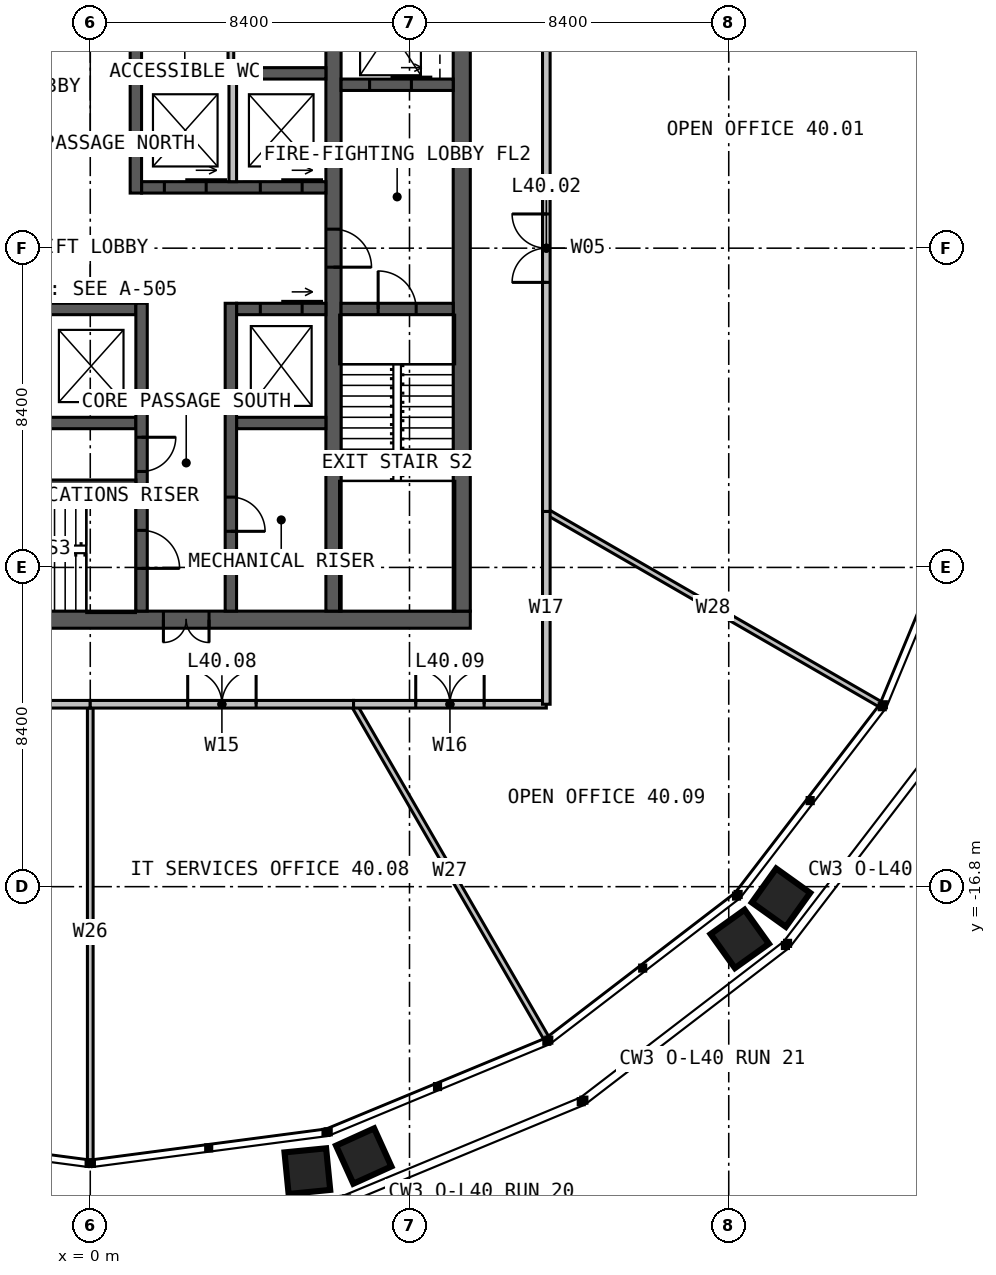
"""IFC4 building model, lengths in metres.
Left out: names, types, materials, properties, quantities, classifications, styles, units other than length and angle.
Written with IfcOpenShell. Run it as: python <this file> out.ifc"""

import sys

from ifc_helpers import new_model, si_unit, direction, frame, frame_2d, origin, place, context, subcontext, project, spatial, rectangle, extrude, element, fill, save


model = new_model("IFC4")
c1 = context("Model", 3, precision=1e-05, world=origin(), true_north=direction((0.0, 1.0)))
c2 = subcontext(c1, "Body", "Model", "MODEL_VIEW")
j1 = project(units=[si_unit("LENGTHUNIT", "METRE"), si_unit("PLANEANGLEUNIT", "RADIAN")], contexts=[c1])
p1 = place(None, origin())
s1 = spatial("IfcSite", under=j1, at=p1, CompositionType="ELEMENT")
p2 = place(p1, origin())
s2 = spatial("IfcBuilding", under=s1, at=p2, CompositionType="ELEMENT")
p3 = place(p2, frame((0.0, 0.0, 167.0)))
s3 = spatial("IfcBuildingStorey", under=s2, at=p3, CompositionType="ELEMENT", Elevation=167.0)
p4 = place(p3, frame((10.0, -9.775, 0.0), z_axis=(0.0, 0.0, 1.0), x_axis=(-1.0, 0.0, 0.0)))
e1 = element("IfcWall", 1, at=p4, inside=s3, PredefinedType="SOLIDWALL", context=c2, shape_type="SweptSolid", body=[
    extrude(rectangle(XDim=20.0, YDim=0.45, at=frame_2d((10.0, 0.0))), origin(), (0.0, 0.0, 1.0), 4.0),
])
p5 = place(p4, frame((6.875, 0.0, 0.0)))
e2 = element("IfcOpeningElement", 2, at=p5, cuts=e1, PredefinedType="OPENING", context=c2, shape_type="SweptSolid", body=[
    extrude(rectangle(XDim=1.2, YDim=2.2, at=frame_2d((0.6, 1.1))), frame((0.0, 0.235, 0.0), z_axis=(0.0, -1.0, 0.0), x_axis=(1.0, 0.0, 0.0)), (0.0, 0.0, 1.0), 0.47),
])
p6 = place(p3, frame((9.775, -9.55, 0.0), z_axis=(0.0, 0.0, 1.0), x_axis=(0.0, 1.0, 0.0)))
e3 = element("IfcWall", 3, at=p6, inside=s3, PredefinedType="SOLIDWALL", context=c2, shape_type="SweptSolid", body=[
    extrude(rectangle(XDim=19.1, YDim=0.45, at=frame_2d((9.55, 0.0))), origin(), (0.0, 0.0, 1.0), 4.0),
])
p7 = place(p3, frame((6.4, 9.55, 0.0), z_axis=(0.0, 0.0, 1.0), x_axis=(0.0, -1.0, 0.0)))
e4 = element("IfcWall", 4, at=p7, inside=s3, PredefinedType="SOLIDWALL", context=c2, shape_type="SweptSolid", body=[
    extrude(rectangle(XDim=19.1, YDim=0.4, at=frame_2d((9.55, 0.0))), origin(), (0.0, 0.0, 1.0), 4.0),
])
p8 = place(p7, frame((9.05, 0.0, 0.0)))
e5 = element("IfcOpeningElement", 5, at=p8, cuts=e4, PredefinedType="OPENING", context=c2, shape_type="SweptSolid", body=[
    extrude(rectangle(XDim=1.0, YDim=2.2, at=frame_2d((0.5, 1.1))), frame((0.0, 0.21, 0.0), z_axis=(0.0, -1.0, 0.0), x_axis=(1.0, 0.0, 0.0)), (0.0, 0.0, 1.0), 0.42),
])
p9 = place(p3, frame((1.35, 1.6, 0.0), z_axis=(0.0, 0.0, 1.0), x_axis=(1.0, 0.0, 0.0)))
e6 = element("IfcWall", 6, at=p9, inside=s3, PredefinedType="SOLIDWALL", context=c2, shape_type="SweptSolid", body=[
    extrude(rectangle(XDim=4.85, YDim=0.3, at=frame_2d((2.425, 0.0))), origin(), (0.0, 0.0, 1.0), 4.0),
])
p10 = place(p9, frame((0.6, 0.0, 0.0)))
e7 = element("IfcOpeningElement", 7, at=p10, cuts=e6, PredefinedType="OPENING", context=c2, shape_type="SweptSolid", body=[
    extrude(rectangle(XDim=1.1, YDim=2.2, at=frame_2d((0.55, 1.1))), frame((0.0, 0.16, 0.0), z_axis=(0.0, -1.0, 0.0), x_axis=(1.0, 0.0, 0.0)), (0.0, 0.0, 1.0), 0.32),
])
p11 = place(p9, frame((3.125, 0.0, 0.0)))
e8 = element("IfcOpeningElement", 8, at=p11, cuts=e6, PredefinedType="OPENING", context=c2, shape_type="SweptSolid", body=[
    extrude(rectangle(XDim=1.1, YDim=2.2, at=frame_2d((0.55, 1.1))), frame((0.0, 0.16, 0.0), z_axis=(0.0, -1.0, 0.0), x_axis=(1.0, 0.0, 0.0)), (0.0, 0.0, 1.0), 0.32),
])
p12 = place(p3, frame((1.35, 4.6, 0.0), z_axis=(0.0, 0.0, 1.0), x_axis=(1.0, 0.0, 0.0)))
e9 = element("IfcWall", 9, at=p12, inside=s3, PredefinedType="SOLIDWALL", context=c2, shape_type="SweptSolid", body=[
    extrude(rectangle(XDim=4.85, YDim=0.3, at=frame_2d((2.425, 0.0))), origin(), (0.0, 0.0, 1.0), 4.0),
])
p13 = place(p3, frame((1.2, 1.45, 0.0), z_axis=(0.0, 0.0, 1.0), x_axis=(0.0, 1.0, 0.0)))
e10 = element("IfcWall", 10, at=p13, inside=s3, PredefinedType="SOLIDWALL", context=c2, shape_type="SweptSolid", body=[
    extrude(rectangle(XDim=8.1, YDim=0.3, at=frame_2d((4.05, 0.0))), origin(), (0.0, 0.0, 1.0), 4.0),
])
p14 = place(p13, frame((3.8, 0.0, 0.0)))
e11 = element("IfcOpeningElement", 11, at=p14, cuts=e10, PredefinedType="OPENING", context=c2, shape_type="SweptSolid", body=[
    extrude(rectangle(XDim=1.0, YDim=2.2, at=frame_2d((0.5, 1.1))), frame((0.0, 0.16, 0.0), z_axis=(0.0, -1.0, 0.0), x_axis=(1.0, 0.0, 0.0)), (0.0, 0.0, 1.0), 0.32),
])
p15 = place(p13, frame((6.15, 0.0, 0.0)))
e12 = element("IfcOpeningElement", 12, at=p15, cuts=e10, PredefinedType="OPENING", context=c2, shape_type="SweptSolid", body=[
    extrude(rectangle(XDim=1.0, YDim=2.2, at=frame_2d((0.5, 1.1))), frame((0.0, 0.16, 0.0), z_axis=(0.0, -1.0, 0.0), x_axis=(1.0, 0.0, 0.0)), (0.0, 0.0, 1.0), 0.32),
])
p16 = place(p3, frame((-6.2, -1.6, 0.0), z_axis=(0.0, 0.0, 1.0), x_axis=(1.0, 0.0, 0.0)))
e13 = element("IfcWall", 13, at=p16, inside=s3, PredefinedType="SOLIDWALL", context=c2, shape_type="SweptSolid", body=[
    extrude(rectangle(XDim=7.4, YDim=0.3, at=frame_2d((3.7, 0.0))), origin(), (0.0, 0.0, 1.0), 4.0),
])
p17 = place(p3, frame((3.85, -1.6, 0.0), z_axis=(0.0, 0.0, 1.0), x_axis=(1.0, 0.0, 0.0)))
e14 = element("IfcWall", 14, at=p17, inside=s3, PredefinedType="SOLIDWALL", context=c2, shape_type="SweptSolid", body=[
    extrude(rectangle(XDim=2.35, YDim=0.3, at=frame_2d((1.175, 0.0))), origin(), (0.0, 0.0, 1.0), 4.0),
])
p18 = place(p17, frame((0.625, 0.0, 0.0)))
e15 = element("IfcOpeningElement", 15, at=p18, cuts=e14, PredefinedType="OPENING", context=c2, shape_type="SweptSolid", body=[
    extrude(rectangle(XDim=1.1, YDim=2.2, at=frame_2d((0.55, 1.1))), frame((0.0, 0.16, 0.0), z_axis=(0.0, -1.0, 0.0), x_axis=(1.0, 0.0, 0.0)), (0.0, 0.0, 1.0), 0.32),
])
p19 = place(p3, frame((-6.2, -4.6, 0.0), z_axis=(0.0, 0.0, 1.0), x_axis=(1.0, 0.0, 0.0)))
e16 = element("IfcWall", 16, at=p19, inside=s3, PredefinedType="SOLIDWALL", context=c2, shape_type="SweptSolid", body=[
    extrude(rectangle(XDim=7.4, YDim=0.3, at=frame_2d((3.7, 0.0))), origin(), (0.0, 0.0, 1.0), 4.0),
])
p20 = place(p3, frame((3.85, -4.6, 0.0), z_axis=(0.0, 0.0, 1.0), x_axis=(1.0, 0.0, 0.0)))
e17 = element("IfcWall", 17, at=p20, inside=s3, PredefinedType="SOLIDWALL", context=c2, shape_type="SweptSolid", body=[
    extrude(rectangle(XDim=2.35, YDim=0.3, at=frame_2d((1.175, 0.0))), origin(), (0.0, 0.0, 1.0), 4.0),
])
p21 = place(p3, frame((1.35, -1.45, 0.0), z_axis=(0.0, 0.0, 1.0), x_axis=(0.0, -1.0, 0.0)))
e18 = element("IfcWall", 18, at=p21, inside=s3, PredefinedType="SOLIDWALL", context=c2, shape_type="SweptSolid", body=[
    extrude(rectangle(XDim=8.1, YDim=0.3, at=frame_2d((4.05, 0.0))), origin(), (0.0, 0.0, 1.0), 4.0),
])
p22 = place(p21, frame((5.975, 0.0, 0.0)))
e19 = element("IfcOpeningElement", 19, at=p22, cuts=e18, PredefinedType="OPENING", context=c2, shape_type="SweptSolid", body=[
    extrude(rectangle(XDim=1.0, YDim=2.2, at=frame_2d((0.5, 1.1))), frame((0.0, 0.16, 0.0), z_axis=(0.0, -1.0, 0.0), x_axis=(1.0, 0.0, 0.0)), (0.0, 0.0, 1.0), 0.32),
])
p23 = place(p21, frame((3.525, 0.0, 0.0)))
e20 = element("IfcOpeningElement", 20, at=p23, cuts=e18, PredefinedType="OPENING", context=c2, shape_type="SweptSolid", body=[
    extrude(rectangle(XDim=0.9, YDim=2.2, at=frame_2d((0.45, 1.1))), frame((0.0, 0.16, 0.0), z_axis=(0.0, -1.0, 0.0), x_axis=(1.0, 0.0, 0.0)), (0.0, 0.0, 1.0), 0.32),
])
p24 = place(p3, frame((3.7, -1.45, 0.0), z_axis=(0.0, 0.0, 1.0), x_axis=(0.0, -1.0, 0.0)))
e21 = element("IfcWall", 21, at=p24, inside=s3, PredefinedType="SOLIDWALL", context=c2, shape_type="SweptSolid", body=[
    extrude(rectangle(XDim=8.1, YDim=0.3, at=frame_2d((4.05, 0.0))), origin(), (0.0, 0.0, 1.0), 4.0),
])
p25 = place(p24, frame((5.1, 0.0, 0.0)))
e22 = element("IfcOpeningElement", 22, at=p25, cuts=e21, PredefinedType="OPENING", context=c2, shape_type="SweptSolid", body=[
    extrude(rectangle(XDim=0.9, YDim=2.2, at=frame_2d((0.45, 1.1))), frame((0.0, 0.16, 0.0), z_axis=(0.0, -1.0, 0.0), x_axis=(1.0, 0.0, 0.0)), (0.0, 0.0, 1.0), 0.32),
])
p26 = place(p3, frame((-6.2, -6.2, 0.0), z_axis=(0.0, 0.0, 1.0), x_axis=(1.0, 0.0, 0.0)))
e23 = element("IfcWall", 23, at=p26, inside=s3, PredefinedType="SOLIDWALL", context=c2, shape_type="SweptSolid", body=[
    extrude(rectangle(XDim=7.4, YDim=0.2, at=frame_2d((3.7, 0.0))), origin(), (0.0, 0.0, 1.0), 4.0),
])
p27 = place(p3, frame((6.6, -1.6, 0.0), z_axis=(0.0, 0.0, 1.0), x_axis=(1.0, 0.0, 0.0)))
e24 = element("IfcWall", 24, at=p27, inside=s3, PredefinedType="SOLIDWALL", context=c2, shape_type="SweptSolid", body=[
    extrude(rectangle(XDim=2.95, YDim=0.3, at=frame_2d((1.475, 0.0))), origin(), (0.0, 0.0, 1.0), 4.0),
])
p28 = place(p27, frame((0.975, 0.0, 0.0)))
e25 = element("IfcOpeningElement", 25, at=p28, cuts=e24, PredefinedType="OPENING", context=c2, shape_type="SweptSolid", body=[
    extrude(rectangle(XDim=1.0, YDim=2.2, at=frame_2d((0.5, 1.1))), frame((0.0, 0.16, 0.0), z_axis=(0.0, -1.0, 0.0), x_axis=(1.0, 0.0, 0.0)), (0.0, 0.0, 1.0), 0.32),
])
p29 = place(p3, frame((6.6, 4.3, 0.0), z_axis=(0.0, 0.0, 1.0), x_axis=(1.0, 0.0, 0.0)))
e26 = element("IfcWall", 26, at=p29, inside=s3, PredefinedType="SOLIDWALL", context=c2, shape_type="SweptSolid", body=[
    extrude(rectangle(XDim=2.95, YDim=0.3, at=frame_2d((1.475, 0.0))), origin(), (0.0, 0.0, 1.0), 4.0),
])
p30 = place(p29, frame((0.75, 0.0, 0.0)))
e27 = element("IfcOpeningElement", 27, at=p30, cuts=e26, PredefinedType="OPENING", context=c2, shape_type="SweptSolid", body=[
    extrude(rectangle(XDim=1.1, YDim=2.2, at=frame_2d((0.55, 1.1))), frame((0.0, 0.16, 0.0), z_axis=(0.0, -1.0, 0.0), x_axis=(1.0, 0.0, 0.0)), (0.0, 0.0, 1.0), 0.32),
])
p31 = place(p3, frame((3.75, 1.75, 0.0), z_axis=(0.0, 0.0, 1.0), x_axis=(0.0, 1.0, 0.0)))
e28 = element("IfcWall", 28, at=p31, inside=s3, PredefinedType="SOLIDWALL", context=c2, shape_type="SweptSolid", body=[
    extrude(rectangle(XDim=2.7, YDim=0.2, at=frame_2d((1.35, 0.0))), origin(), (0.0, 0.0, 1.0), 3.75),
])
p32 = place(p3, frame((3.7, 4.75, 0.0), z_axis=(0.0, 0.0, 1.0), x_axis=(0.0, 1.0, 0.0)))
e29 = element("IfcWall", 29, at=p32, inside=s3, PredefinedType="PARTITIONING", context=c2, shape_type="SweptSolid", body=[
    extrude(rectangle(XDim=1.975, YDim=0.15, at=frame_2d((0.988, 0.0))), origin(), (0.0, 0.0, 1.0), 3.75),
])
p33 = place(p3, frame((12.0, -6.928, 0.0), z_axis=(0.0, 0.0, 1.0), x_axis=(0.866025941747, -0.49999906822, 0.0)))
e30 = element("IfcWall", 30, at=p33, inside=s3, PredefinedType="PARTITIONING", context=c2, shape_type="SweptSolid", body=[
    extrude(rectangle(XDim=10.136, YDim=0.15, at=frame_2d((5.068, 0.0))), origin(), (0.0, 0.0, 1.0), 2.79),
])
p34 = place(p3, frame((0.0, -12.0, 0.0), z_axis=(0.0, 0.0, 1.0), x_axis=(0.0, -1.0, 0.0)))
e31 = element("IfcWall", 31, at=p34, inside=s3, PredefinedType="PARTITIONING", context=c2, shape_type="SweptSolid", body=[
    extrude(rectangle(XDim=11.992, YDim=0.15, at=frame_2d((5.996, 0.0))), origin(), (0.0, 0.0, 1.0), 2.79),
])
p35 = place(p3, frame((6.928, -12.0, 0.0), z_axis=(0.0, 0.0, 1.0), x_axis=(0.49999906822, -0.866025941747, 0.0)))
e32 = element("IfcWall", 32, at=p35, inside=s3, PredefinedType="PARTITIONING", context=c2, shape_type="SweptSolid", body=[
    extrude(rectangle(XDim=10.136, YDim=0.15, at=frame_2d((5.068, 0.0))), origin(), (0.0, 0.0, 1.0), 2.79),
])
p36 = place(p3, frame((12.0, -6.928, 0.0), z_axis=(0.0, 0.0, 1.0), x_axis=(0.0, 1.0, 0.0)))
e33 = element("IfcWall", 33, at=p36, inside=s3, PredefinedType="PARTITIONING", context=c2, shape_type="SweptSolid", body=[
    extrude(rectangle(XDim=13.856, YDim=0.2, at=frame_2d((6.928, 0.0))), origin(), (0.0, 0.0, 1.0), 3.8),
])
p37 = place(p36, frame((6.028, 0.0, 0.0)))
e34 = element("IfcOpeningElement", 34, at=p37, cuts=e33, PredefinedType="OPENING", context=c2, shape_type="SweptSolid", body=[
    extrude(rectangle(XDim=1.8, YDim=2.2, at=frame_2d((0.9, 1.1))), frame((0.0, 0.11, 0.0), z_axis=(0.0, -1.0, 0.0), x_axis=(1.0, 0.0, 0.0)), (0.0, 0.0, 1.0), 0.22),
])
p38 = place(p3, frame((-6.928, -12.0, 0.0), z_axis=(0.0, 0.0, 1.0), x_axis=(1.0, 0.0, 0.0)))
e35 = element("IfcWall", 35, at=p38, inside=s3, PredefinedType="PARTITIONING", context=c2, shape_type="SweptSolid", body=[
    extrude(rectangle(XDim=6.928, YDim=0.2, at=frame_2d((3.464, 0.0))), origin(), (0.0, 0.0, 1.0), 3.8),
])
p39 = place(p38, frame((2.964, 0.0, 0.0)))
e36 = element("IfcOpeningElement", 36, at=p39, cuts=e35, PredefinedType="OPENING", context=c2, shape_type="SweptSolid", body=[
    extrude(rectangle(XDim=1.0, YDim=2.2, at=frame_2d((0.5, 1.1))), frame((0.0, 0.11, 0.0), z_axis=(0.0, -1.0, 0.0), x_axis=(1.0, 0.0, 0.0)), (0.0, 0.0, 1.0), 0.22),
])
p40 = place(p3, frame((0.0, -12.0, 0.0), z_axis=(0.0, 0.0, 1.0), x_axis=(1.0, 0.0, 0.0)))
e37 = element("IfcWall", 37, at=p40, inside=s3, PredefinedType="PARTITIONING", context=c2, shape_type="SweptSolid", body=[
    extrude(rectangle(XDim=6.928, YDim=0.2, at=frame_2d((3.464, 0.0))), origin(), (0.0, 0.0, 1.0), 3.8),
])
p41 = place(p40, frame((2.564, 0.0, 0.0)))
e38 = element("IfcOpeningElement", 38, at=p41, cuts=e37, PredefinedType="OPENING", context=c2, shape_type="SweptSolid", body=[
    extrude(rectangle(XDim=1.8, YDim=2.2, at=frame_2d((0.9, 1.1))), frame((0.0, 0.11, 0.0), z_axis=(0.0, -1.0, 0.0), x_axis=(1.0, 0.0, 0.0)), (0.0, 0.0, 1.0), 0.22),
])
p42 = place(p3, frame((6.928, -12.0, 0.0), z_axis=(0.0, 0.0, 1.0), x_axis=(1.0, 0.0, 0.0)))
e39 = element("IfcWall", 39, at=p42, inside=s3, PredefinedType="PARTITIONING", context=c2, shape_type="SweptSolid", body=[
    extrude(rectangle(XDim=5.072, YDim=0.2, at=frame_2d((2.536, 0.0))), origin(), (0.0, 0.0, 1.0), 3.8),
])
p43 = place(p42, frame((1.636, 0.0, 0.0)))
e40 = element("IfcOpeningElement", 40, at=p43, cuts=e39, PredefinedType="OPENING", context=c2, shape_type="SweptSolid", body=[
    extrude(rectangle(XDim=1.8, YDim=2.2, at=frame_2d((0.9, 1.1))), frame((0.0, 0.11, 0.0), z_axis=(0.0, -1.0, 0.0), x_axis=(1.0, 0.0, 0.0)), (0.0, 0.0, 1.0), 0.22),
])
p44 = place(p3, frame((12.0, -12.0, 0.0), z_axis=(0.0, 0.0, 1.0), x_axis=(0.0, 1.0, 0.0)))
e41 = element("IfcWall", 41, at=p44, inside=s3, PredefinedType="PARTITIONING", context=c2, shape_type="SweptSolid", body=[
    extrude(rectangle(XDim=5.072, YDim=0.2, at=frame_2d((2.536, 0.0))), origin(), (0.0, 0.0, 1.0), 3.8),
])
p45 = place(p5, origin())
e42 = element("IfcDoor", 42, at=p45, inside=s3, OperationType="DOUBLE_DOOR_SINGLE_SWING", PredefinedType="DOOR", context=c2, shape_type="SweptSolid", body=[
    extrude(rectangle(XDim=1.2, YDim=2.2, at=frame_2d((0.6, 1.1))), frame((0.0, 0.025, 0.0), z_axis=(0.0, -1.0, 0.0), x_axis=(1.0, 0.0, 0.0)), (0.0, 0.0, 1.0), 0.05),
])
fill(e2, e42)
p46 = place(p8, origin())
e43 = element("IfcDoor", 43, at=p46, inside=s3, OperationType="SINGLE_SWING_RIGHT", PredefinedType="DOOR", context=c2, shape_type="SweptSolid", body=[
    extrude(rectangle(XDim=1.0, YDim=2.2, at=frame_2d((0.5, 1.1))), frame((0.0, 0.025, 0.0), z_axis=(0.0, -1.0, 0.0), x_axis=(1.0, 0.0, 0.0)), (0.0, 0.0, 1.0), 0.05),
])
fill(e5, e43)
p47 = place(p28, origin())
e44 = element("IfcDoor", 44, at=p47, inside=s3, OperationType="SINGLE_SWING_LEFT", PredefinedType="DOOR", context=c2, shape_type="SweptSolid", body=[
    extrude(rectangle(XDim=1.0, YDim=2.2, at=frame_2d((0.5, 1.1))), frame((0.0, 0.025, 0.0), z_axis=(0.0, -1.0, 0.0), x_axis=(1.0, 0.0, 0.0)), (0.0, 0.0, 1.0), 0.05),
])
fill(e25, e44)
p48 = place(p22, origin())
e45 = element("IfcDoor", 45, at=p48, inside=s3, OperationType="SINGLE_SWING_RIGHT", PredefinedType="DOOR", context=c2, shape_type="SweptSolid", body=[
    extrude(rectangle(XDim=1.0, YDim=2.2, at=frame_2d((0.5, 1.1))), frame((0.0, 0.025, 0.0), z_axis=(0.0, -1.0, 0.0), x_axis=(1.0, 0.0, 0.0)), (0.0, 0.0, 1.0), 0.05),
])
fill(e19, e45)
p49 = place(p23, origin())
e46 = element("IfcDoor", 46, at=p49, inside=s3, OperationType="SINGLE_SWING_LEFT", PredefinedType="DOOR", context=c2, shape_type="SweptSolid", body=[
    extrude(rectangle(XDim=0.9, YDim=2.2, at=frame_2d((0.45, 1.1))), frame((0.0, 0.025, 0.0), z_axis=(0.0, -1.0, 0.0), x_axis=(1.0, 0.0, 0.0)), (0.0, 0.0, 1.0), 0.05),
])
fill(e20, e46)
p50 = place(p25, origin())
e47 = element("IfcDoor", 47, at=p50, inside=s3, OperationType="SINGLE_SWING_RIGHT", PredefinedType="DOOR", context=c2, shape_type="SweptSolid", body=[
    extrude(rectangle(XDim=0.9, YDim=2.2, at=frame_2d((0.45, 1.1))), frame((0.0, 0.025, 0.0), z_axis=(0.0, -1.0, 0.0), x_axis=(1.0, 0.0, 0.0)), (0.0, 0.0, 1.0), 0.05),
])
fill(e22, e47)
p51 = place(p10, origin())
e48 = element("IfcDoor", 48, at=p51, inside=s3, OperationType="SLIDING_TO_LEFT", PredefinedType="DOOR", context=c2, shape_type="SweptSolid", body=[
    extrude(rectangle(XDim=1.1, YDim=2.2, at=frame_2d((0.55, 1.1))), frame((0.0, 0.025, 0.0), z_axis=(0.0, -1.0, 0.0), x_axis=(1.0, 0.0, 0.0)), (0.0, 0.0, 1.0), 0.05),
])
fill(e7, e48)
p52 = place(p11, origin())
e49 = element("IfcDoor", 49, at=p52, inside=s3, OperationType="SLIDING_TO_LEFT", PredefinedType="DOOR", context=c2, shape_type="SweptSolid", body=[
    extrude(rectangle(XDim=1.1, YDim=2.2, at=frame_2d((0.55, 1.1))), frame((0.0, 0.025, 0.0), z_axis=(0.0, -1.0, 0.0), x_axis=(1.0, 0.0, 0.0)), (0.0, 0.0, 1.0), 0.05),
])
fill(e8, e49)
p53 = place(p18, origin())
e50 = element("IfcDoor", 50, at=p53, inside=s3, OperationType="SLIDING_TO_LEFT", PredefinedType="DOOR", context=c2, shape_type="SweptSolid", body=[
    extrude(rectangle(XDim=1.1, YDim=2.2, at=frame_2d((0.55, 1.1))), frame((0.0, 0.025, 0.0), z_axis=(0.0, -1.0, 0.0), x_axis=(1.0, 0.0, 0.0)), (0.0, 0.0, 1.0), 0.05),
])
fill(e15, e50)
p54 = place(p30, origin())
e51 = element("IfcDoor", 51, at=p54, inside=s3, OperationType="SLIDING_TO_LEFT", PredefinedType="DOOR", context=c2, shape_type="SweptSolid", body=[
    extrude(rectangle(XDim=1.1, YDim=2.2, at=frame_2d((0.55, 1.1))), frame((0.0, 0.025, 0.0), z_axis=(0.0, -1.0, 0.0), x_axis=(1.0, 0.0, 0.0)), (0.0, 0.0, 1.0), 0.05),
])
fill(e27, e51)
p55 = place(p37, origin())
e52 = element("IfcDoor", 52, at=p55, inside=s3, OperationType="DOUBLE_DOOR_SINGLE_SWING", PredefinedType="DOOR", context=c2, shape_type="SweptSolid", body=[
    extrude(rectangle(XDim=1.8, YDim=2.2, at=frame_2d((0.9, 1.1))), frame((0.0, 0.025, 0.0), z_axis=(0.0, -1.0, 0.0), x_axis=(1.0, 0.0, 0.0)), (0.0, 0.0, 1.0), 0.05),
])
fill(e34, e52)
p56 = place(p41, origin())
e53 = element("IfcDoor", 53, at=p56, inside=s3, OperationType="DOUBLE_DOOR_SINGLE_SWING", PredefinedType="DOOR", context=c2, shape_type="SweptSolid", body=[
    extrude(rectangle(XDim=1.8, YDim=2.2, at=frame_2d((0.9, 1.1))), frame((0.0, 0.025, 0.0), z_axis=(0.0, -1.0, 0.0), x_axis=(1.0, 0.0, 0.0)), (0.0, 0.0, 1.0), 0.05),
])
fill(e38, e53)
p57 = place(p43, origin())
e54 = element("IfcDoor", 54, at=p57, inside=s3, OperationType="DOUBLE_DOOR_SINGLE_SWING", PredefinedType="DOOR", context=c2, shape_type="SweptSolid", body=[
    extrude(rectangle(XDim=1.8, YDim=2.2, at=frame_2d((0.9, 1.1))), frame((0.0, 0.025, 0.0), z_axis=(0.0, -1.0, 0.0), x_axis=(1.0, 0.0, 0.0)), (0.0, 0.0, 1.0), 0.05),
])
fill(e40, e54)
save(model, sys.argv[1])
